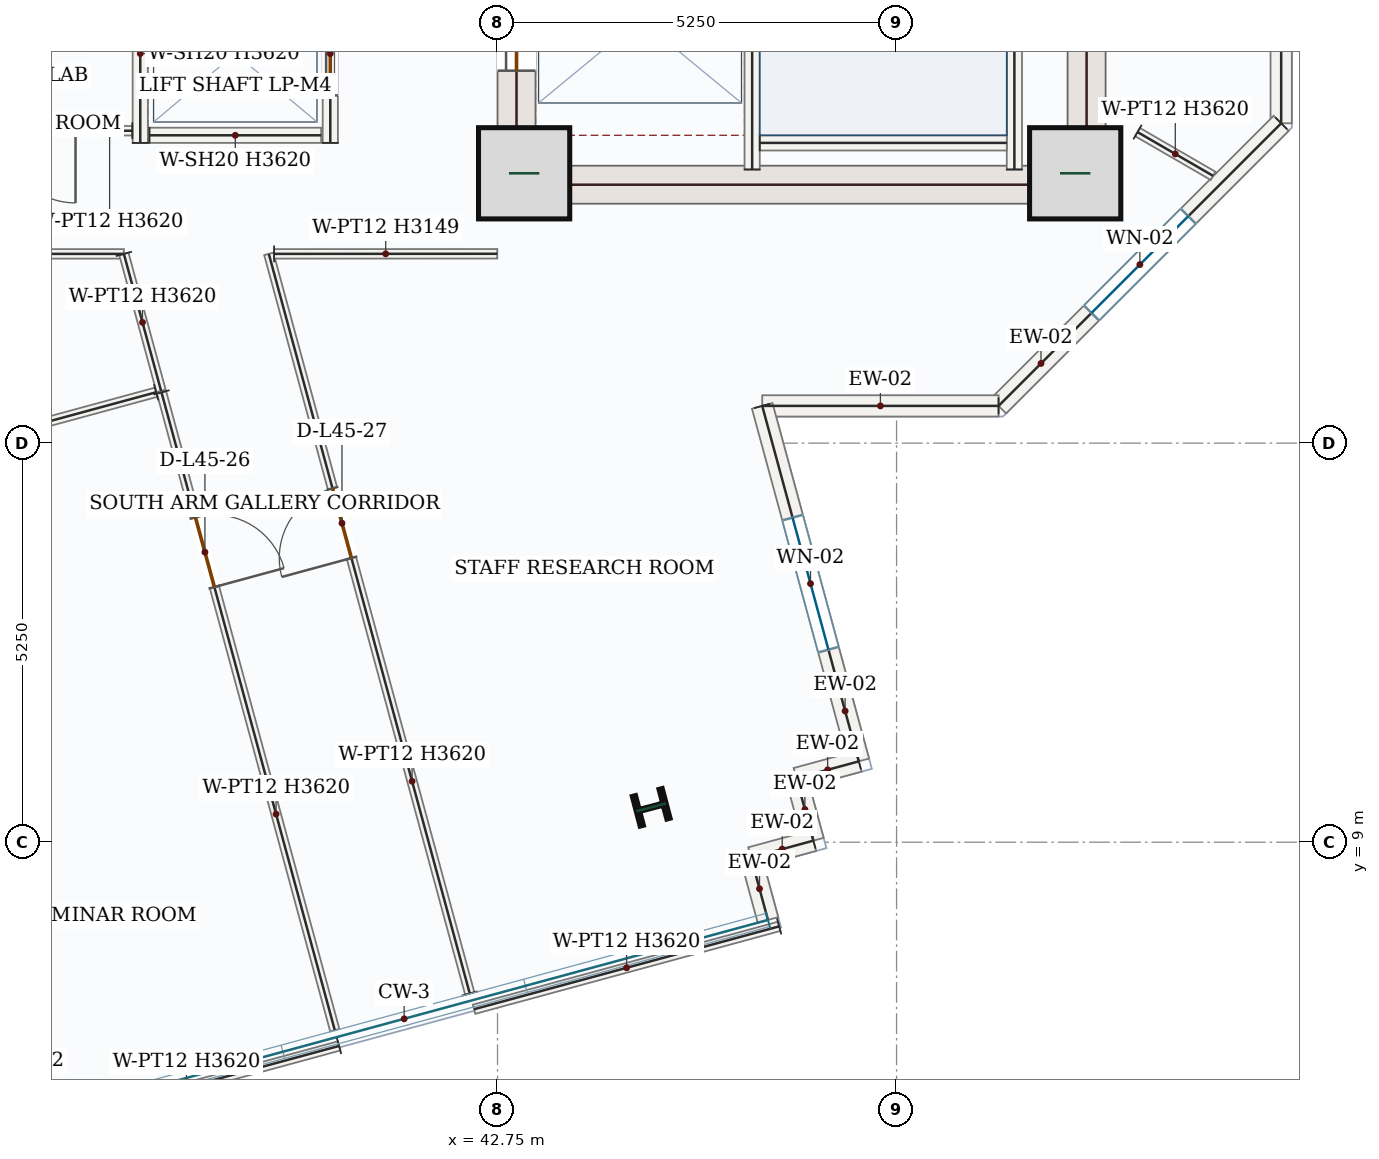
"""IFC4 building model, lengths in metres.
Left out: names, types, materials, properties, quantities, classifications, styles, units other than length and angle.
Written with IfcOpenShell. Run it as: python <this file> out.ifc"""

import sys

from ifc_helpers import new_model, si_unit, direction, frame, frame_2d, origin, origin_2d, place, context, subcontext, project, spatial, rectangle, i_section, extrude, source, transform, mapped, element, fill, save


model = new_model("IFC4")
c1 = context("Model", 3, precision=1e-05, world=origin(), true_north=direction((0.0, 1.0)))
c2 = subcontext(c1, "Body", "Model", "MODEL_VIEW")
j1 = project(units=[si_unit("LENGTHUNIT", "METRE"), si_unit("PLANEANGLEUNIT", "RADIAN")], contexts=[c1])
p1 = place(None, origin())
s1 = spatial("IfcSite", under=j1, at=p1, CompositionType="ELEMENT")
p2 = place(p1, origin())
s2 = spatial("IfcBuilding", under=s1, at=p2, CompositionType="ELEMENT")
p3 = place(p2, frame((0.0, 0.0, 194.1)))
s3 = spatial("IfcBuildingStorey", under=s2, at=p3, CompositionType="ELEMENT", Elevation=194.1)
p4 = place(p3, frame((43.0, 17.4, 0.0), z_axis=(0.0, 0.0, 1.0), x_axis=(0.0, 1.0, 0.0)))
e1 = element("IfcWall", 1, at=p4, inside=s3, PredefinedType="SHEAR", context=c2, shape_type="SweptSolid", body=[
    extrude(rectangle(XDim=8.55, YDim=0.5, at=frame_2d((4.275, 0.0))), origin(), (0.0, 0.0, 1.0), 3.62),
])
p5 = place(p4, frame((6.65, 0.0, 0.0)))
e2 = element("IfcOpeningElement", 2, at=p5, cuts=e1, PredefinedType="OPENING", context=c2, shape_type="SweptSolid", body=[
    extrude(rectangle(XDim=1.1, YDim=2.2, at=frame_2d((0.55, 1.1))), frame((0.0, 0.26, 0.0), z_axis=(0.0, -1.0, 0.0), x_axis=(1.0, 0.0, 0.0)), (0.0, 0.0, 1.0), 0.52),
])
p6 = place(p4, frame((1.75, 0.0, 0.0)))
e3 = element("IfcOpeningElement", 3, at=p6, cuts=e1, PredefinedType="OPENING", context=c2, shape_type="SweptSolid", body=[
    extrude(rectangle(XDim=1.3, YDim=2.2, at=frame_2d((0.65, 1.1))), frame((0.0, 0.26, 0.0), z_axis=(0.0, -1.0, 0.0), x_axis=(1.0, 0.0, 0.0)), (0.0, 0.0, 1.0), 0.52),
])
p7 = place(p4, frame((4.55, 0.0, 0.0)))
e4 = element("IfcOpeningElement", 4, at=p7, cuts=e1, PredefinedType="OPENING", context=c2, shape_type="SweptSolid", body=[
    extrude(rectangle(XDim=0.88, YDim=2.1, at=frame_2d((0.44, 1.05))), frame((0.0, 0.26, 0.0), z_axis=(0.0, -1.0, 0.0), x_axis=(1.0, 0.0, 0.0)), (0.0, 0.0, 1.0), 0.52),
])
m1 = source(origin(), c2, "Body", "SweptSolid", [
    extrude(rectangle(XDim=8.55, YDim=0.5, at=frame_2d((4.275, 0.0))), origin(), (0.0, 0.0, 1.0), 3.62),
])
p8 = place(p3, frame((50.5, 17.4, 0.0), z_axis=(0.0, 0.0, 1.0), x_axis=(0.0, 1.0, 0.0)))
e5 = element("IfcWall", 5, at=p8, inside=s3, PredefinedType="SHEAR", context=c2, shape_type="MappedRepresentation", body=[
    mapped(m1, transform((0.0, 0.0, 0.0), x_axis=(1.0, 0.0, 0.0), y_axis=(0.0, 1.0, 0.0), z_axis=(0.0, 0.0, 1.0), scale=1.0)),
])
m2 = source(origin(), c2, "Body", "SweptSolid", [
    extrude(rectangle(XDim=7.0, YDim=0.5, at=frame_2d((3.5, 0.0))), origin(), (0.0, 0.0, 1.0), 3.62),
])
p9 = place(p3, frame((43.25, 17.65, 0.0), z_axis=(0.0, 0.0, 1.0), x_axis=(1.0, 0.0, 0.0)))
e6 = element("IfcWall", 6, at=p9, inside=s3, PredefinedType="SHEAR", context=c2, shape_type="MappedRepresentation", body=[
    mapped(m2, transform((0.0, 0.0, 0.0), x_axis=(1.0, 0.0, 0.0), y_axis=(0.0, 1.0, 0.0), z_axis=(0.0, 0.0, 1.0), scale=1.0)),
])
m3 = source(origin(), c2, "Body", "SweptSolid", [
    extrude(rectangle(XDim=1.2, YDim=1.2, at=origin_2d()), origin(), (0.0, 0.0, 1.0), 3.9),
])
for number, where, z_axis, x_axis in (
    (7, (43.1, 17.8, 0.0), (0.0, 0.0, 1.0), (1.0, 0.0, 0.0)),
    (8, (50.35, 17.8, 0.0), (0.0, 0.0, 1.0), (1.0, 0.0, 0.0)),
):
    element("IfcColumn", number, at=place(p3, frame(where, z_axis=z_axis, x_axis=x_axis)), inside=s3, PredefinedType="COLUMN", context=c2, shape_type="MappedRepresentation", body=[
        mapped(m3, transform((0.0, 0.0, 0.0), x_axis=(1.0, 0.0, 0.0), y_axis=(0.0, 1.0, 0.0), z_axis=(0.0, 0.0, 1.0), scale=1.0)),
    ])
m4 = source(origin(), c2, "Body", "SweptSolid", [
    extrude(i_section(OverallWidth=0.404, OverallDepth=0.407, WebThickness=0.027, FlangeThickness=0.044, FilletRadius=0.018, at=origin_2d()), origin(), (0.0, 0.0, 1.0), 3.9),
])
p10 = place(p3, frame((44.772, 9.459, 0.0), z_axis=(0.0, 0.0, 1.0), x_axis=(-0.255445757936, 0.966823388604, 0.0)))
e9 = element("IfcColumn", 9, at=p10, inside=s3, PredefinedType="COLUMN", context=c2, shape_type="MappedRepresentation", body=[
    mapped(m4, transform((0.0, 0.0, 0.0), x_axis=(1.0, 0.0, 0.0), y_axis=(0.0, 1.0, 0.0), z_axis=(0.0, 0.0, 1.0), scale=1.0)),
])
p11 = place(p3, frame((53.06, 24.734, 0.0), z_axis=(0.0, 0.0, 1.0), x_axis=(0.0, -1.0, 0.0)))
e10 = element("IfcWall", 10, at=p11, inside=s3, PredefinedType="SOLIDWALL", context=c2, shape_type="SweptSolid", body=[
    extrude(rectangle(XDim=6.276, YDim=0.28, at=frame_2d((3.138, 0.0))), origin(), (0.0, 0.0, 1.0), 3.62),
])
p12 = place(p11, frame((2.238, 0.0, 0.85)))
e11 = element("IfcOpeningElement", 11, at=p12, cuts=e10, PredefinedType="OPENING", context=c2, shape_type="SweptSolid", body=[
    extrude(rectangle(XDim=1.8, YDim=1.75, at=frame_2d((0.9, 0.875))), frame((0.0, 0.15, 0.0), z_axis=(0.0, -1.0, 0.0), x_axis=(1.0, 0.0, 0.0)), (0.0, 0.0, 1.0), 0.3),
])
p13 = place(p3, frame((53.06, 18.458, 0.0), z_axis=(0.0, 0.0, 1.0), x_axis=(-0.707106781187, -0.707106781187, 0.0)))
e12 = element("IfcWall", 12, at=p13, inside=s3, PredefinedType="SOLIDWALL", context=c2, shape_type="SweptSolid", body=[
    extrude(rectangle(XDim=5.258, YDim=0.28, at=frame_2d((2.629, 0.0))), origin(), (0.0, 0.0, 1.0), 3.62),
])
p14 = place(p13, frame((1.729, 0.0, 0.85)))
e13 = element("IfcOpeningElement", 13, at=p14, cuts=e12, PredefinedType="OPENING", context=c2, shape_type="SweptSolid", body=[
    extrude(rectangle(XDim=1.8, YDim=1.75, at=frame_2d((0.9, 0.875))), frame((0.0, 0.15, 0.0), z_axis=(0.0, -1.0, 0.0), x_axis=(1.0, 0.0, 0.0)), (0.0, 0.0, 1.0), 0.3),
])
m5 = source(origin(), c2, "Body", "SweptSolid", [
    extrude(rectangle(XDim=3.11, YDim=0.28, at=frame_2d((1.555, 0.0))), origin(), (0.0, 0.0, 1.0), 3.62),
])
p15 = place(p3, frame((49.342, 14.74, 0.0), z_axis=(0.0, 0.0, 1.0), x_axis=(-1.0, 0.0, 0.0)))
e14 = element("IfcWall", 14, at=p15, inside=s3, PredefinedType="SOLIDWALL", context=c2, shape_type="MappedRepresentation", body=[
    mapped(m5, transform((0.0, 0.0, 0.0), x_axis=(1.0, 0.0, 0.0), y_axis=(0.0, 1.0, 0.0), z_axis=(0.0, 0.0, 1.0), scale=1.0)),
])
p16 = place(p3, frame((46.232, 14.74, 0.0), z_axis=(0.0, 0.0, 1.0), x_axis=(0.262175182741, -0.965020296965, 0.0)))
e15 = element("IfcWall", 15, at=p16, inside=s3, PredefinedType="SOLIDWALL", context=c2, shape_type="SweptSolid", body=[
    extrude(rectangle(XDim=4.846, YDim=0.28, at=frame_2d((2.423, 0.0))), origin(), (0.0, 0.0, 1.0), 3.62),
])
p17 = place(p16, frame((1.523, 0.0, 0.85)))
e16 = element("IfcOpeningElement", 16, at=p17, cuts=e15, PredefinedType="OPENING", context=c2, shape_type="SweptSolid", body=[
    extrude(rectangle(XDim=1.8, YDim=1.75, at=frame_2d((0.9, 0.875))), frame((0.0, 0.15, 0.0), z_axis=(0.0, -1.0, 0.0), x_axis=(1.0, 0.0, 0.0)), (0.0, 0.0, 1.0), 0.3),
])
m6 = source(origin(), c2, "Body", "SweptSolid", [
    extrude(rectangle(XDim=0.85, YDim=0.28, at=frame_2d((0.425, 0.0))), origin(), (0.0, 0.0, 1.0), 3.62),
])
for number, where, z_axis, x_axis in (
    (17, (47.503, 10.063, 0.0), (0.0, 0.0, 1.0), (-0.965, -0.262, 0.0)),
    (18, (46.683, 9.841, 0.0), (0.0, 0.0, 1.0), (0.262, -0.965, 0.0)),
    (19, (46.906, 9.02, 0.0), (0.0, 0.0, 1.0), (-0.965, -0.262, 0.0)),
    (20, (46.085, 8.798, 0.0), (0.0, 0.0, 1.0), (0.262, -0.965, 0.0)),
):
    element("IfcWall", number, at=place(p3, frame(where, z_axis=z_axis, x_axis=x_axis)), inside=s3, PredefinedType="SOLIDWALL", context=c2, shape_type="MappedRepresentation", body=[
        mapped(m6, transform((0.0, 0.0, 0.0), x_axis=(1.0, 0.0, 0.0), y_axis=(0.0, 1.0, 0.0), z_axis=(0.0, 0.0, 1.0), scale=1.0)),
    ])
m7 = source(origin(), c2, "Body", "SweptSolid", [
    extrude(rectangle(XDim=7.87, YDim=0.2, at=frame_2d((3.935, 0.0))), origin(), (0.0, 0.0, 1.0), 3.62),
])
p18 = place(p3, frame((49.55, 17.85, 0.0), z_axis=(0.0, 0.0, 1.0), x_axis=(0.0, 1.0, 0.0)))
e21 = element("IfcWall", 21, at=p18, inside=s3, PredefinedType="SOLIDWALL", context=c2, shape_type="MappedRepresentation", body=[
    mapped(m7, transform((0.0, 0.0, 0.0), x_axis=(1.0, 0.0, 0.0), y_axis=(0.0, 1.0, 0.0), z_axis=(0.0, 0.0, 1.0), scale=1.0)),
])
p19 = place(p3, frame((46.1, 17.85, 0.0), z_axis=(0.0, 0.0, 1.0), x_axis=(0.0, 1.0, 0.0)))
e22 = element("IfcWall", 22, at=p19, inside=s3, PredefinedType="SOLIDWALL", context=c2, shape_type="SweptSolid", body=[
    extrude(rectangle(XDim=8.0, YDim=0.2, at=frame_2d((4.0, 0.0))), origin(), (0.0, 0.0, 1.0), 3.62),
])
p20 = place(p19, frame((6.3, 0.0, 0.0)))
e23 = element("IfcOpeningElement", 23, at=p20, cuts=e22, PredefinedType="OPENING", context=c2, shape_type="SweptSolid", body=[
    extrude(rectangle(XDim=1.05, YDim=2.15, at=frame_2d((0.525, 1.075))), frame((0.0, 0.11, 0.0), z_axis=(0.0, -1.0, 0.0), x_axis=(1.0, 0.0, 0.0)), (0.0, 0.0, 1.0), 0.22),
])
m8 = source(origin(), c2, "Body", "SweptSolid", [
    extrude(rectangle(XDim=3.25, YDim=0.2, at=frame_2d((1.625, 0.0))), origin(), (0.0, 0.0, 1.0), 3.62),
])
p21 = place(p3, frame((46.2, 18.2, 0.0), z_axis=(0.0, 0.0, 1.0), x_axis=(1.0, 0.0, 0.0)))
e24 = element("IfcWall", 24, at=p21, inside=s3, PredefinedType="SOLIDWALL", context=c2, shape_type="MappedRepresentation", body=[
    mapped(m8, transform((0.0, 0.0, 0.0), x_axis=(1.0, 0.0, 0.0), y_axis=(0.0, 1.0, 0.0), z_axis=(0.0, 0.0, 1.0), scale=1.0)),
])
m9 = source(origin(), c2, "Body", "SweptSolid", [
    extrude(rectangle(XDim=2.35, YDim=0.2, at=frame_2d((1.175, 0.0))), origin(), (0.0, 0.0, 1.0), 3.62),
])
p22 = place(p3, frame((38.05, 18.2, 0.0), z_axis=(0.0, 0.0, 1.0), x_axis=(0.0, 1.0, 0.0)))
e25 = element("IfcWall", 25, at=p22, inside=s3, PredefinedType="SOLIDWALL", context=c2, shape_type="MappedRepresentation", body=[
    mapped(m9, transform((0.0, 0.0, 0.0), x_axis=(1.0, 0.0, 0.0), y_axis=(0.0, 1.0, 0.0), z_axis=(0.0, 0.0, 1.0), scale=1.0)),
])
p23 = place(p3, frame((40.55, 18.2, 0.0), z_axis=(0.0, 0.0, 1.0), x_axis=(0.0, 1.0, 0.0)))
e26 = element("IfcWall", 26, at=p23, inside=s3, PredefinedType="SOLIDWALL", context=c2, shape_type="SweptSolid", body=[
    extrude(rectangle(XDim=2.35, YDim=0.2, at=frame_2d((1.175, 0.0))), origin(), (0.0, 0.0, 1.0), 3.62),
])
p24 = place(p23, frame((0.625, 0.0, 0.0)))
e27 = element("IfcOpeningElement", 27, at=p24, cuts=e26, PredefinedType="OPENING", context=c2, shape_type="SweptSolid", body=[
    extrude(rectangle(XDim=1.1, YDim=2.15, at=frame_2d((0.55, 1.075))), frame((0.0, 0.11, 0.0), z_axis=(0.0, -1.0, 0.0), x_axis=(1.0, 0.0, 0.0)), (0.0, 0.0, 1.0), 0.22),
])
m10 = source(origin(), c2, "Body", "SweptSolid", [
    extrude(rectangle(XDim=2.26, YDim=0.2, at=frame_2d((1.13, 0.0))), origin(), (0.0, 0.0, 1.0), 3.62),
])
p25 = place(p3, frame((38.17, 18.3, 0.0), z_axis=(0.0, 0.0, 1.0), x_axis=(1.0, 0.0, 0.0)))
e28 = element("IfcWall", 28, at=p25, inside=s3, PredefinedType="SOLIDWALL", context=c2, shape_type="MappedRepresentation", body=[
    mapped(m10, transform((0.0, 0.0, 0.0), x_axis=(1.0, 0.0, 0.0), y_axis=(0.0, 1.0, 0.0), z_axis=(0.0, 0.0, 1.0), scale=1.0)),
])
p26 = place(p3, frame((37.945, 18.36, 0.0), z_axis=(0.0, 0.0, 1.0), x_axis=(-1.0, 0.0, 0.0)))
e29 = element("IfcWall", 29, at=p26, inside=s3, PredefinedType="PARTITIONING", context=c2, shape_type="SweptSolid", body=[
    extrude(rectangle(XDim=1.907, YDim=0.125, at=frame_2d((0.954, 0.0))), origin(), (0.0, 0.0, 1.0), 3.62),
])
p27 = place(p26, frame((0.747, 0.0, 0.0)))
e30 = element("IfcOpeningElement", 30, at=p27, cuts=e29, PredefinedType="OPENING", context=c2, shape_type="SweptSolid", body=[
    extrude(rectangle(XDim=0.95, YDim=2.15, at=frame_2d((0.475, 1.075))), frame((0.0, 0.073, 0.0), z_axis=(0.0, -1.0, 0.0), x_axis=(1.0, 0.0, 0.0)), (0.0, 0.0, 1.0), 0.145),
])
p28 = place(p3, frame((30.045, 16.74, 0.0), z_axis=(0.0, 0.0, 1.0), x_axis=(1.0, 0.0, 0.0)))
e31 = element("IfcWall", 31, at=p28, inside=s3, PredefinedType="PARTITIONING", context=c2, shape_type="SweptSolid", body=[
    extrude(rectangle(XDim=7.79, YDim=0.125, at=frame_2d((3.895, 0.0))), origin(), (0.0, 0.0, 1.0), 3.62),
])
p29 = place(p28, frame((5.335, 0.0, 0.0)))
e32 = element("IfcOpeningElement", 32, at=p29, cuts=e31, PredefinedType="OPENING", context=c2, shape_type="SweptSolid", body=[
    extrude(rectangle(XDim=0.95, YDim=2.15, at=frame_2d((0.475, 1.075))), frame((0.0, 0.073, 0.0), z_axis=(0.0, -1.0, 0.0), x_axis=(1.0, 0.0, 0.0)), (0.0, 0.0, 1.0), 0.145),
])
m11 = source(origin(), c2, "Body", "SweptSolid", [
    extrude(rectangle(XDim=1.868, YDim=0.125, at=frame_2d((0.934, 0.0))), origin(), (0.0, 0.0, 1.0), 3.62),
])
p30 = place(p3, frame((37.834, 16.74, 0.0), z_axis=(0.0, 0.0, 1.0), x_axis=(0.262166249224, -0.965022723964, 0.0)))
e33 = element("IfcWall", 33, at=p30, inside=s3, PredefinedType="PARTITIONING", context=c2, shape_type="MappedRepresentation", body=[
    mapped(m11, transform((0.0, 0.0, 0.0), x_axis=(1.0, 0.0, 0.0), y_axis=(0.0, 1.0, 0.0), z_axis=(0.0, 0.0, 1.0), scale=1.0)),
])
m12 = source(origin(), c2, "Body", "SweptSolid", [
    extrude(rectangle(XDim=5.527, YDim=0.125, at=frame_2d((2.764, 0.0))), origin(), (0.0, 0.0, 1.0), 3.62),
])
p31 = place(p3, frame((38.259, 14.92, 0.0), z_axis=(0.0, 0.0, 1.0), x_axis=(-0.965004985248, -0.262231535949, 0.0)))
e34 = element("IfcWall", 34, at=p31, inside=s3, PredefinedType="PARTITIONING", context=c2, shape_type="MappedRepresentation", body=[
    mapped(m12, transform((0.0, 0.0, 0.0), x_axis=(1.0, 0.0, 0.0), y_axis=(0.0, 1.0, 0.0), z_axis=(0.0, 0.0, 1.0), scale=1.0)),
])
p32 = place(p3, frame((38.329, 14.918, 0.0), z_axis=(0.0, 0.0, 1.0), x_axis=(0.262166936223, -0.965022537328, 0.0)))
e35 = element("IfcWall", 35, at=p32, inside=s3, PredefinedType="PARTITIONING", context=c2, shape_type="SweptSolid", body=[
    extrude(rectangle(XDim=8.695, YDim=0.125, at=frame_2d((4.348, 0.0))), origin(), (0.0, 0.0, 1.0), 3.62),
])
p33 = place(p32, frame((1.704, 0.0, 0.0)))
e36 = element("IfcOpeningElement", 36, at=p33, cuts=e35, PredefinedType="OPENING", context=c2, shape_type="SweptSolid", body=[
    extrude(rectangle(XDim=0.95, YDim=2.15, at=frame_2d((0.475, 1.075))), frame((0.0, 0.073, 0.0), z_axis=(0.0, -1.0, 0.0), x_axis=(1.0, 0.0, 0.0)), (0.0, 0.0, 1.0), 0.145),
])
m13 = source(origin(), c2, "Body", "SweptSolid", [
    extrude(rectangle(XDim=4.16, YDim=0.125, at=frame_2d((2.08, 0.0))), origin(), (0.0, 0.0, 1.0), 3.62),
])
p34 = place(p3, frame((40.665, 6.32, 0.0), z_axis=(0.0, 0.0, 1.0), x_axis=(-0.965023387541, -0.262163806614, 0.0)))
e37 = element("IfcWall", 37, at=p34, inside=s3, PredefinedType="PARTITIONING", context=c2, shape_type="MappedRepresentation", body=[
    mapped(m13, transform((0.0, 0.0, 0.0), x_axis=(1.0, 0.0, 0.0), y_axis=(0.0, 1.0, 0.0), z_axis=(0.0, 0.0, 1.0), scale=1.0)),
])
p35 = place(p3, frame((42.385, 7.01, 0.0), z_axis=(0.0, 0.0, 1.0), x_axis=(-0.262203523108, 0.965012597052, 0.0)))
e38 = element("IfcWall", 38, at=p35, inside=s3, PredefinedType="PARTITIONING", context=c2, shape_type="SweptSolid", body=[
    extrude(rectangle(XDim=10.083, YDim=0.125, at=frame_2d((5.042, 0.0))), origin(), (0.0, 0.0, 1.0), 3.62),
])
p36 = place(p35, frame((5.937, 0.0, 0.0)))
e39 = element("IfcOpeningElement", 39, at=p36, cuts=e38, PredefinedType="OPENING", context=c2, shape_type="SweptSolid", body=[
    extrude(rectangle(XDim=0.95, YDim=2.15, at=frame_2d((0.475, 1.075))), frame((0.0, 0.073, 0.0), z_axis=(0.0, -1.0, 0.0), x_axis=(1.0, 0.0, 0.0)), (0.0, 0.0, 1.0), 0.145),
])
m14 = source(origin(), c2, "Body", "SweptSolid", [
    extrude(rectangle(XDim=2.936, YDim=0.125, at=frame_2d((1.468, 0.0))), origin(), (0.0, 0.0, 1.0), 3.149),
])
p37 = place(p3, frame((39.811, 16.74, 0.0), z_axis=(0.0, 0.0, 1.0), x_axis=(0.999999913555, 0.00041580038, 0.0)))
e40 = element("IfcWall", 40, at=p37, inside=s3, PredefinedType="PARTITIONING", context=c2, shape_type="MappedRepresentation", body=[
    mapped(m14, transform((0.0, 0.0, 0.0), x_axis=(1.0, 0.0, 0.0), y_axis=(0.0, 1.0, 0.0), z_axis=(0.0, 0.0, 1.0), scale=1.0)),
])
m15 = source(origin(), c2, "Body", "SweptSolid", [
    extrude(rectangle(XDim=1.148, YDim=0.125, at=frame_2d((0.574, 0.0))), origin(), (0.0, 0.0, 1.0), 3.62),
])
p38 = place(p3, frame((51.17, 18.342, 0.0), z_axis=(0.0, 0.0, 1.0), x_axis=(0.865416582459, -0.501053029933, 0.0)))
e41 = element("IfcWall", 41, at=p38, inside=s3, PredefinedType="PARTITIONING", context=c2, shape_type="MappedRepresentation", body=[
    mapped(m15, transform((0.0, 0.0, 0.0), x_axis=(1.0, 0.0, 0.0), y_axis=(0.0, 1.0, 0.0), z_axis=(0.0, 0.0, 1.0), scale=1.0)),
])
p39 = place(p3, frame((46.455, 7.893, 0.0), z_axis=(0.0, 0.0, 1.0), x_axis=(-0.965023387541, -0.262163806614, 0.0)))
e42 = element("IfcWall", 42, at=p39, inside=s3, PredefinedType="PARTITIONING", context=c2, shape_type="MappedRepresentation", body=[
    mapped(m13, transform((0.0, 0.0, 0.0), x_axis=(1.0, 0.0, 0.0), y_axis=(0.0, 1.0, 0.0), z_axis=(0.0, 0.0, 1.0), scale=1.0)),
])
m16 = source(origin(), c2, "Body", "SweptSolid", [
    extrude(rectangle(XDim=1.8, YDim=1.75, at=frame_2d((0.9, 0.875))), frame((0.0, 0.03, 0.0), z_axis=(0.0, -1.0, 0.0), x_axis=(1.0, 0.0, 0.0)), (0.0, 0.0, 1.0), 0.06),
])
p40 = place(p14, origin())
e43 = element("IfcWindow", 43, at=p40, inside=s3, PartitioningType="DOUBLE_PANEL_VERTICAL", PredefinedType="WINDOW", context=c2, shape_type="MappedRepresentation", body=[
    mapped(m16, transform((0.0, 0.0, 0.0), x_axis=(1.0, 0.0, 0.0), y_axis=(0.0, 1.0, 0.0), z_axis=(0.0, 0.0, 1.0), scale=1.0)),
])
fill(e13, e43)
p41 = place(p17, origin())
e44 = element("IfcWindow", 44, at=p41, inside=s3, PartitioningType="DOUBLE_PANEL_VERTICAL", PredefinedType="WINDOW", context=c2, shape_type="MappedRepresentation", body=[
    mapped(m16, transform((0.0, 0.0, 0.0), x_axis=(1.0, 0.0, 0.0), y_axis=(0.0, 1.0, 0.0), z_axis=(0.0, 0.0, 1.0), scale=1.0)),
])
fill(e16, e44)
m17 = source(origin(), c2, "Body", "SweptSolid", [
    extrude(rectangle(XDim=1.3, YDim=2.2, at=frame_2d((0.65, 1.1))), frame((0.0, 0.025, 0.0), z_axis=(0.0, -1.0, 0.0), x_axis=(1.0, 0.0, 0.0)), (0.0, 0.0, 1.0), 0.05),
])
p42 = place(p6, origin())
e45 = element("IfcDoor", 45, at=p42, inside=s3, OperationType="DOUBLE_DOOR_SLIDING", PredefinedType="DOOR", context=c2, shape_type="MappedRepresentation", body=[
    mapped(m17, transform((0.0, 0.0, 0.0), x_axis=(1.0, 0.0, 0.0), y_axis=(0.0, 1.0, 0.0), z_axis=(0.0, 0.0, 1.0), scale=1.0)),
])
fill(e3, e45)
m18 = source(origin(), c2, "Body", "SweptSolid", [
    extrude(rectangle(XDim=1.1, YDim=2.15, at=frame_2d((0.55, 1.075))), frame((0.0, 0.025, 0.0), z_axis=(0.0, -1.0, 0.0), x_axis=(1.0, 0.0, 0.0)), (0.0, 0.0, 1.0), 0.05),
])
p43 = place(p24, origin())
e46 = element("IfcDoor", 46, at=p43, inside=s3, OperationType="DOUBLE_DOOR_SLIDING", PredefinedType="DOOR", context=c2, shape_type="MappedRepresentation", body=[
    mapped(m18, transform((0.0, 0.0, 0.0), x_axis=(1.0, 0.0, 0.0), y_axis=(0.0, 1.0, 0.0), z_axis=(0.0, 0.0, 1.0), scale=1.0)),
])
fill(e27, e46)
m19 = source(origin(), c2, "Body", "SweptSolid", [
    extrude(rectangle(XDim=0.95, YDim=2.15, at=frame_2d((0.475, 1.075))), frame((0.0, 0.025, 0.0), z_axis=(0.0, -1.0, 0.0), x_axis=(1.0, 0.0, 0.0)), (0.0, 0.0, 1.0), 0.05),
])
p44 = place(p27, origin())
e47 = element("IfcDoor", 47, at=p44, inside=s3, OperationType="SINGLE_SWING_LEFT", PredefinedType="DOOR", context=c2, shape_type="MappedRepresentation", body=[
    mapped(m19, transform((0.0, 0.0, 0.0), x_axis=(1.0, 0.0, 0.0), y_axis=(0.0, 1.0, 0.0), z_axis=(0.0, 0.0, 1.0), scale=1.0)),
])
fill(e30, e47)
p45 = place(p33, origin())
e48 = element("IfcDoor", 48, at=p45, inside=s3, OperationType="SINGLE_SWING_RIGHT", PredefinedType="DOOR", context=c2, shape_type="MappedRepresentation", body=[
    mapped(m19, transform((0.0, 0.0, 0.0), x_axis=(1.0, 0.0, 0.0), y_axis=(0.0, 1.0, 0.0), z_axis=(0.0, 0.0, 1.0), scale=1.0)),
])
fill(e36, e48)
p46 = place(p36, origin())
e49 = element("IfcDoor", 49, at=p46, inside=s3, OperationType="SINGLE_SWING_LEFT", PredefinedType="DOOR", context=c2, shape_type="MappedRepresentation", body=[
    mapped(m19, transform((0.0, 0.0, 0.0), x_axis=(1.0, 0.0, 0.0), y_axis=(0.0, 1.0, 0.0), z_axis=(0.0, 0.0, 1.0), scale=1.0)),
])
fill(e39, e49)
save(model, sys.argv[1])
